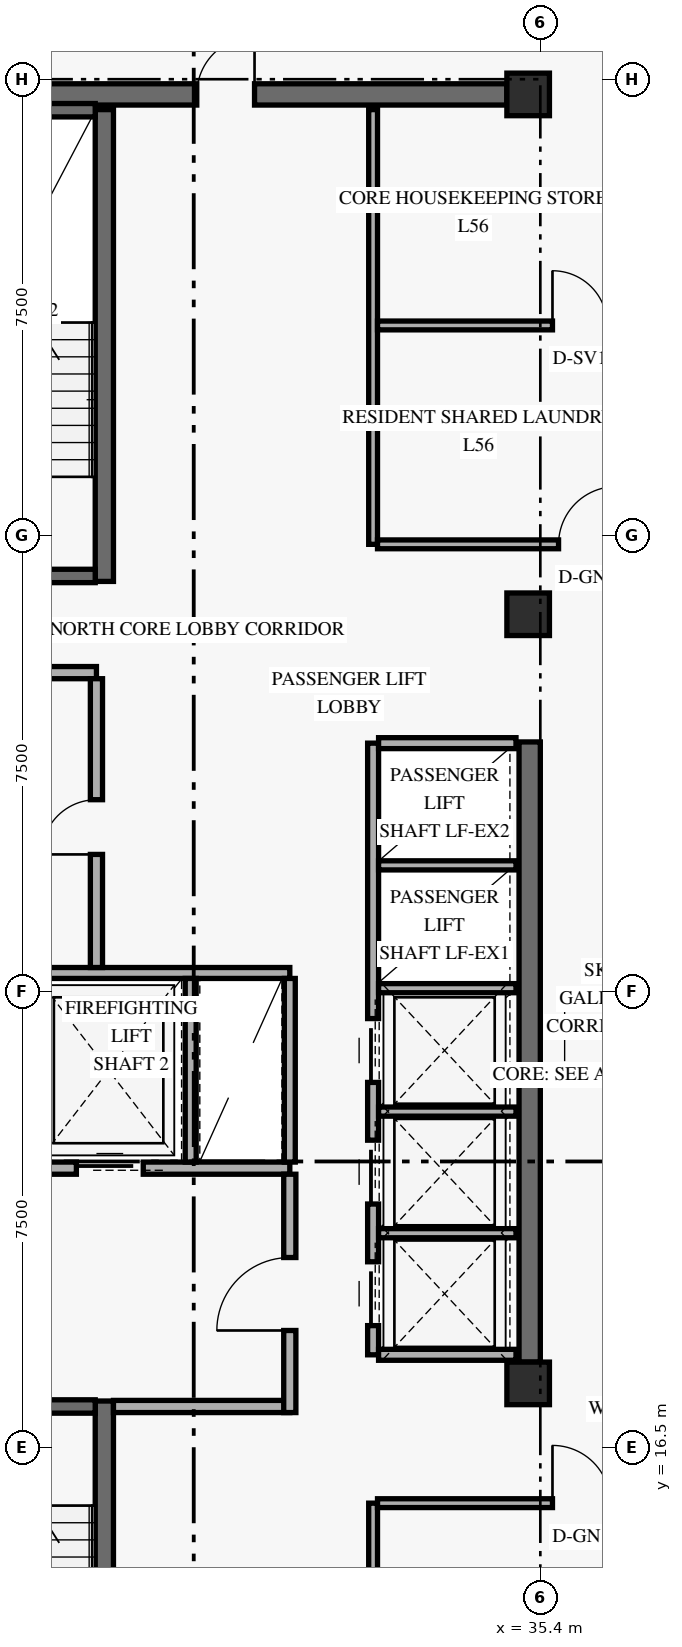
"""IFC4 building model, lengths in metres.
Left out: names, types, materials, properties, quantities, classifications, styles, units other than length and angle.
Written with IfcOpenShell. Run it as: python <this file> out.ifc"""

import sys

from ifc_helpers import new_model, si_unit, direction, frame, frame_2d, origin, origin_2d, place, context, subcontext, project, spatial, rectangle, extrude, element, fill, save


model = new_model("IFC4")
c1 = context("Model", 3, precision=1e-05, world=origin(), true_north=direction((0.0, 1.0)))
c2 = subcontext(c1, "Body", "Model", "MODEL_VIEW")
j1 = project(units=[si_unit("LENGTHUNIT", "METRE"), si_unit("PLANEANGLEUNIT", "RADIAN")], contexts=[c1])
p1 = place(None, origin())
s1 = spatial("IfcSite", under=j1, at=p1, CompositionType="ELEMENT")
p2 = place(p1, origin())
s2 = spatial("IfcBuilding", under=s1, at=p2, CompositionType="ELEMENT")
p3 = place(p2, frame((0.0, 0.0, 216.6)))
s3 = spatial("IfcBuildingStorey", under=s2, at=p3, CompositionType="ELEMENT", Elevation=216.6)
p4 = place(p3, frame((35.225, 17.9, 0.0), z_axis=(0.0, 0.0, 1.0), x_axis=(0.0, 1.0, 0.0)))
e1 = element("IfcWall", 1, at=p4, inside=s3, PredefinedType="SHEAR", context=c2, shape_type="SweptSolid", body=[
    extrude(rectangle(XDim=10.2, YDim=0.35, at=frame_2d((5.1, 0.0))), origin(), (0.0, 0.0, 1.0), 2.821),
])
p5 = place(p3, frame((24.55, 38.75, 0.0), z_axis=(0.0, 0.0, 1.0), x_axis=(1.0, 0.0, 0.0)))
e2 = element("IfcWall", 2, at=p5, inside=s3, PredefinedType="SHEAR", context=c2, shape_type="SweptSolid", body=[
    extrude(rectangle(XDim=10.3, YDim=0.35, at=frame_2d((5.15, 0.0))), origin(), (0.0, 0.0, 1.0), 3.36),
])
p6 = place(p5, frame((5.2, 0.0, 0.0)))
e3 = element("IfcOpeningElement", 3, at=p6, cuts=e2, PredefinedType="OPENING", context=c2, shape_type="SweptSolid", body=[
    extrude(rectangle(XDim=0.95, YDim=2.15, at=frame_2d((0.475, 1.075))), frame((0.0, 0.185, 0.0), z_axis=(0.0, -1.0, 0.0), x_axis=(1.0, 0.0, 0.0)), (0.0, 0.0, 1.0), 0.37),
])
p7 = place(p3, frame((28.23, 9.5, 0.0), z_axis=(0.0, 0.0, 1.0), x_axis=(0.0, 1.0, 0.0)))
e4 = element("IfcWall", 4, at=p7, inside=s3, PredefinedType="SHEAR", context=c2, shape_type="SweptSolid", body=[
    extrude(rectangle(XDim=7.76, YDim=0.3, at=frame_2d((3.88, 0.0))), origin(), (0.0, 0.0, 1.0), 3.36),
])
p8 = place(p3, frame((24.92, 17.17, 0.0), z_axis=(0.0, 0.0, 1.0), x_axis=(1.0, 0.0, 0.0)))
e5 = element("IfcWall", 5, at=p8, inside=s3, PredefinedType="SHEAR", context=c2, shape_type="SweptSolid", body=[
    extrude(rectangle(XDim=3.16, YDim=0.22, at=frame_2d((1.58, 0.0))), origin(), (0.0, 0.0, 1.0), 3.36),
])
p9 = place(p8, frame((0.78, 0.0, 0.0)))
e6 = element("IfcOpeningElement", 6, at=p9, cuts=e5, PredefinedType="OPENING", context=c2, shape_type="SweptSolid", body=[
    extrude(rectangle(XDim=1.05, YDim=2.15, at=frame_2d((0.525, 1.075))), frame((0.0, 0.12, 0.0), z_axis=(0.0, -1.0, 0.0), x_axis=(1.0, 0.0, 0.0)), (0.0, 0.0, 1.0), 0.24),
])
p10 = place(p3, frame((28.23, 30.74, 0.0), z_axis=(0.0, 0.0, 1.0), x_axis=(0.0, 1.0, 0.0)))
e7 = element("IfcWall", 7, at=p10, inside=s3, PredefinedType="SHEAR", context=c2, shape_type="SweptSolid", body=[
    extrude(rectangle(XDim=7.76, YDim=0.3, at=frame_2d((3.88, 0.0))), origin(), (0.0, 0.0, 1.0), 3.36),
])
p11 = place(p3, frame((24.92, 30.83, 0.0), z_axis=(0.0, 0.0, 1.0), x_axis=(1.0, 0.0, 0.0)))
e8 = element("IfcWall", 8, at=p11, inside=s3, PredefinedType="SHEAR", context=c2, shape_type="SweptSolid", body=[
    extrude(rectangle(XDim=3.16, YDim=0.22, at=frame_2d((1.58, 0.0))), origin(), (0.0, 0.0, 1.0), 3.36),
])
p12 = place(p11, frame((0.78, 0.0, 0.0)))
e9 = element("IfcOpeningElement", 9, at=p12, cuts=e8, PredefinedType="OPENING", context=c2, shape_type="SweptSolid", body=[
    extrude(rectangle(XDim=1.05, YDim=2.15, at=frame_2d((0.525, 1.075))), frame((0.0, 0.12, 0.0), z_axis=(0.0, -1.0, 0.0), x_axis=(1.0, 0.0, 0.0)), (0.0, 0.0, 1.0), 0.24),
])
p13 = place(p3, frame((24.92, 38.49, 0.0), z_axis=(0.0, 0.0, 1.0), x_axis=(1.0, 0.0, 0.0)))
e10 = element("IfcWall", 10, at=p13, inside=s3, PredefinedType="SHEAR", context=c2, shape_type="SweptSolid", body=[
    extrude(rectangle(XDim=3.16, YDim=0.22, at=frame_2d((1.58, 0.0))), origin(), (0.0, 0.0, 1.0), 3.36),
])
for number, where, z_axis, x_axis in (
    (11, (35.2, 17.55, 0.0), (0.0, 0.0, 1.0), (1.0, 0.0, 0.0)),
    (12, (35.2, 30.2, 0.0), (0.0, 0.0, 1.0), (1.0, 0.0, 0.0)),
    (13, (35.2, 38.75, 0.0), (0.0, 0.0, 1.0), (1.0, 0.0, 0.0)),
):
    element("IfcColumn", number, at=place(p3, frame(where, z_axis=z_axis, x_axis=x_axis)), inside=s3, PredefinedType="COLUMN", context=c2, shape_type="SweptSolid", body=[
        extrude(rectangle(XDim=0.7, YDim=0.7, at=origin_2d()), origin(), (0.0, 0.0, 1.0), 3.6),
    ])
p14 = place(p3, frame((24.45, 21.09, 0.0), z_axis=(0.0, 0.0, 1.0), x_axis=(1.0, 0.0, 0.0)))
e14 = element("IfcWall", 14, at=p14, inside=s3, PredefinedType="STANDARD", context=c2, shape_type="SweptSolid", body=[
    extrude(rectangle(XDim=6.83, YDim=0.2, at=frame_2d((3.415, 0.0))), origin(), (0.0, 0.0, 1.0), 3.36),
])
p15 = place(p14, frame((0.72, 0.0, 0.0)))
e15 = element("IfcOpeningElement", 15, at=p15, cuts=e14, PredefinedType="OPENING", context=c2, shape_type="SweptSolid", body=[
    extrude(rectangle(XDim=1.1, YDim=2.2, at=frame_2d((0.55, 1.1))), frame((0.0, 0.11, 0.0), z_axis=(0.0, -1.0, 0.0), x_axis=(1.0, 0.0, 0.0)), (0.0, 0.0, 1.0), 0.22),
])
p16 = place(p14, frame((3.32, 0.0, 0.0)))
e16 = element("IfcOpeningElement", 16, at=p16, cuts=e14, PredefinedType="OPENING", context=c2, shape_type="SweptSolid", body=[
    extrude(rectangle(XDim=1.1, YDim=2.2, at=frame_2d((0.55, 1.1))), frame((0.0, 0.11, 0.0), z_axis=(0.0, -1.0, 0.0), x_axis=(1.0, 0.0, 0.0)), (0.0, 0.0, 1.0), 0.22),
])
p17 = place(p3, frame((28.38, 17.17, 0.0), z_axis=(0.0, 0.0, 1.0), x_axis=(1.0, 0.0, 0.0)))
e17 = element("IfcWall", 17, at=p17, inside=s3, PredefinedType="STANDARD", context=c2, shape_type="SweptSolid", body=[
    extrude(rectangle(XDim=2.9, YDim=0.2, at=frame_2d((1.45, 0.0))), origin(), (0.0, 0.0, 1.0), 3.36),
])
p18 = place(p3, frame((31.28, 17.07, 0.0), z_axis=(0.0, 0.0, 1.0), x_axis=(0.0, 1.0, 0.0)))
e18 = element("IfcWall", 18, at=p18, inside=s3, PredefinedType="STANDARD", context=c2, shape_type="SweptSolid", body=[
    extrude(rectangle(XDim=3.92, YDim=0.2, at=frame_2d((1.96, 0.0))), origin(), (0.0, 0.0, 1.0), 2.803),
])
p19 = place(p18, frame((1.35, 0.0, 0.0)))
e19 = element("IfcOpeningElement", 19, at=p19, cuts=e18, PredefinedType="OPENING", context=c2, shape_type="SweptSolid", body=[
    extrude(rectangle(XDim=1.2, YDim=2.15, at=frame_2d((0.6, 1.075))), frame((0.0, 0.11, 0.0), z_axis=(0.0, -1.0, 0.0), x_axis=(1.0, 0.0, 0.0)), (0.0, 0.0, 1.0), 0.22),
])
p20 = place(p3, frame((24.45, 24.3, 0.0), z_axis=(0.0, 0.0, 1.0), x_axis=(1.0, 0.0, 0.0)))
e20 = element("IfcWall", 20, at=p20, inside=s3, PredefinedType="STANDARD", context=c2, shape_type="SweptSolid", body=[
    extrude(rectangle(XDim=6.83, YDim=0.18, at=frame_2d((3.415, 0.0))), origin(), (0.0, 0.0, 1.0), 3.36),
])
for number, where, z_axis, x_axis in (
    (21, (29.65, 21.19, 0.0), (0.0, 0.0, 1.0), (0.0, 1.0, 0.0)),
    (22, (31.28, 21.19, 0.0), (0.0, 0.0, 1.0), (0.0, 1.0, 0.0)),
):
    element("IfcWall", number, at=place(p3, frame(where, z_axis=z_axis, x_axis=x_axis)), inside=s3, PredefinedType="STANDARD", context=c2, shape_type="SweptSolid", body=[
        extrude(rectangle(XDim=3.02, YDim=0.18, at=frame_2d((1.51, 0.0))), origin(), (0.0, 0.0, 1.0), 3.36),
    ])
p21 = place(p3, frame((24.45, 29.24, 0.0), z_axis=(0.0, 0.0, 1.0), x_axis=(1.0, 0.0, 0.0)))
e23 = element("IfcWall", 23, at=p21, inside=s3, PredefinedType="STANDARD", context=c2, shape_type="SweptSolid", body=[
    extrude(rectangle(XDim=3.65, YDim=0.2, at=frame_2d((1.825, 0.0))), origin(), (0.0, 0.0, 1.0), 3.36),
])
p22 = place(p3, frame((28.1, 24.39, 0.0), z_axis=(0.0, 0.0, 1.0), x_axis=(0.0, 1.0, 0.0)))
e24 = element("IfcWall", 24, at=p22, inside=s3, PredefinedType="STANDARD", context=c2, shape_type="SweptSolid", body=[
    extrude(rectangle(XDim=4.75, YDim=0.2, at=frame_2d((2.375, 0.0))), origin(), (0.0, 0.0, 1.0), 3.36),
])
p23 = place(p22, frame((1.86, 0.0, 0.0)))
e25 = element("IfcOpeningElement", 25, at=p23, cuts=e24, PredefinedType="OPENING", context=c2, shape_type="SweptSolid", body=[
    extrude(rectangle(XDim=0.9, YDim=2.1, at=frame_2d((0.45, 1.05))), frame((0.0, 0.11, 0.0), z_axis=(0.0, -1.0, 0.0), x_axis=(1.0, 0.0, 0.0)), (0.0, 0.0, 1.0), 0.22),
])
p24 = place(p3, frame((32.65, 18.02, 0.0), z_axis=(0.0, 0.0, 1.0), x_axis=(0.0, 1.0, 0.0)))
e26 = element("IfcWall", 26, at=p24, inside=s3, PredefinedType="STANDARD", context=c2, shape_type="SweptSolid", body=[
    extrude(rectangle(XDim=10.06, YDim=0.18, at=frame_2d((5.03, 0.0))), origin(), (0.0, 0.0, 1.0), 3.36),
])
p25 = place(p24, frame((0.48, 0.0, 0.0)))
e27 = element("IfcOpeningElement", 27, at=p25, cuts=e26, PredefinedType="OPENING", context=c2, shape_type="SweptSolid", body=[
    extrude(rectangle(XDim=1.05, YDim=2.2, at=frame_2d((0.525, 1.1))), frame((0.0, 0.1, 0.0), z_axis=(0.0, -1.0, 0.0), x_axis=(1.0, 0.0, 0.0)), (0.0, 0.0, 1.0), 0.2),
])
p26 = place(p24, frame((2.48, 0.0, 0.0)))
e28 = element("IfcOpeningElement", 28, at=p26, cuts=e26, PredefinedType="OPENING", context=c2, shape_type="SweptSolid", body=[
    extrude(rectangle(XDim=1.05, YDim=2.2, at=frame_2d((0.525, 1.1))), frame((0.0, 0.1, 0.0), z_axis=(0.0, -1.0, 0.0), x_axis=(1.0, 0.0, 0.0)), (0.0, 0.0, 1.0), 0.2),
])
p27 = place(p24, frame((4.48, 0.0, 0.0)))
e29 = element("IfcOpeningElement", 29, at=p27, cuts=e26, PredefinedType="OPENING", context=c2, shape_type="SweptSolid", body=[
    extrude(rectangle(XDim=1.05, YDim=2.2, at=frame_2d((0.525, 1.1))), frame((0.0, 0.1, 0.0), z_axis=(0.0, -1.0, 0.0), x_axis=(1.0, 0.0, 0.0)), (0.0, 0.0, 1.0), 0.2),
])
for number, where, z_axis, x_axis in (
    (30, (32.74, 18.02, 0.0), (0.0, 0.0, 1.0), (1.0, 0.0, 0.0)),
    (31, (32.74, 28.08, 0.0), (0.0, 0.0, 1.0), (1.0, 0.0, 0.0)),
):
    element("IfcWall", number, at=place(p3, frame(where, z_axis=z_axis, x_axis=x_axis)), inside=s3, PredefinedType="STANDARD", context=c2, shape_type="SweptSolid", body=[
        extrude(rectangle(XDim=2.26, YDim=0.18, at=frame_2d((1.13, 0.0))), origin(), (0.0, 0.0, 1.0), 3.36),
    ])
for number, where, z_axis, x_axis in (
    (32, (32.74, 20.02, 0.0), (0.0, 0.0, 1.0), (1.0, 0.0, 0.0)),
    (33, (32.74, 22.02, 0.0), (0.0, 0.0, 1.0), (1.0, 0.0, 0.0)),
    (34, (32.74, 24.05, 0.0), (0.0, 0.0, 1.0), (1.0, 0.0, 0.0)),
    (35, (32.74, 26.07, 0.0), (0.0, 0.0, 1.0), (1.0, 0.0, 0.0)),
):
    element("IfcWall", number, at=place(p3, frame(where, z_axis=z_axis, x_axis=x_axis)), inside=s3, PredefinedType="STANDARD", context=c2, shape_type="SweptSolid", body=[
        extrude(rectangle(XDim=2.26, YDim=0.15, at=frame_2d((1.13, 0.0))), origin(), (0.0, 0.0, 1.0), 3.36),
    ])
p28 = place(p3, frame((32.65, 9.5, 0.0), z_axis=(0.0, 0.0, 1.0), x_axis=(0.0, 1.0, 0.0)))
e36 = element("IfcWall", 36, at=p28, inside=s3, PredefinedType="PARTITIONING", context=c2, shape_type="SweptSolid", body=[
    extrude(rectangle(XDim=6.08, YDim=0.145, at=frame_2d((3.04, 0.0))), origin(), (0.0, 0.0, 1.0), 3.36),
])
p29 = place(p3, frame((32.722, 15.58, 0.0), z_axis=(0.0, 0.0, 1.0), x_axis=(1.0, 0.0, 0.0)))
e37 = element("IfcWall", 37, at=p29, inside=s3, PredefinedType="PARTITIONING", context=c2, shape_type="SweptSolid", body=[
    extrude(rectangle(XDim=5.228, YDim=0.145, at=frame_2d((2.614, 0.0))), origin(), (0.0, 0.0, 1.0), 2.803),
])
p30 = place(p29, frame((2.877, 0.0, 0.0)))
e38 = element("IfcOpeningElement", 38, at=p30, cuts=e37, PredefinedType="OPENING", context=c2, shape_type="SweptSolid", body=[
    extrude(rectangle(XDim=0.95, YDim=2.15, at=frame_2d((0.475, 1.075))), frame((0.0, 0.083, 0.0), z_axis=(0.0, -1.0, 0.0), x_axis=(1.0, 0.0, 0.0)), (0.0, 0.0, 1.0), 0.165),
])
p31 = place(p3, frame((32.65, 31.35, 0.0), z_axis=(0.0, 0.0, 1.0), x_axis=(0.0, 1.0, 0.0)))
e39 = element("IfcWall", 39, at=p31, inside=s3, PredefinedType="PARTITIONING", context=c2, shape_type="SweptSolid", body=[
    extrude(rectangle(XDim=7.15, YDim=0.145, at=frame_2d((3.575, 0.0))), origin(), (0.0, 0.0, 1.0), 3.36),
])
p32 = place(p3, frame((32.722, 31.35, 0.0), z_axis=(0.0, 0.0, 1.0), x_axis=(1.0, 0.0, 0.0)))
e40 = element("IfcWall", 40, at=p32, inside=s3, PredefinedType="PARTITIONING", context=c2, shape_type="SweptSolid", body=[
    extrude(rectangle(XDim=5.778, YDim=0.145, at=frame_2d((2.889, 0.0))), origin(), (0.0, 0.0, 1.0), 2.803),
])
p33 = place(p32, frame((2.978, 0.0, 0.0)))
e41 = element("IfcOpeningElement", 41, at=p33, cuts=e40, PredefinedType="OPENING", context=c2, shape_type="SweptSolid", body=[
    extrude(rectangle(XDim=0.95, YDim=2.15, at=frame_2d((0.475, 1.075))), frame((0.0, 0.083, 0.0), z_axis=(0.0, -1.0, 0.0), x_axis=(1.0, 0.0, 0.0)), (0.0, 0.0, 1.0), 0.165),
])
p34 = place(p3, frame((32.722, 34.95, 0.0), z_axis=(0.0, 0.0, 1.0), x_axis=(1.0, 0.0, 0.0)))
e42 = element("IfcWall", 42, at=p34, inside=s3, PredefinedType="PARTITIONING", context=c2, shape_type="SweptSolid", body=[
    extrude(rectangle(XDim=5.705, YDim=0.145, at=frame_2d((2.853, 0.0))), origin(), (0.0, 0.0, 1.0), 2.803),
])
p35 = place(p34, frame((2.877, 0.0, 0.0)))
e43 = element("IfcOpeningElement", 43, at=p35, cuts=e42, PredefinedType="OPENING", context=c2, shape_type="SweptSolid", body=[
    extrude(rectangle(XDim=0.9, YDim=2.1, at=frame_2d((0.45, 1.05))), frame((0.0, 0.083, 0.0), z_axis=(0.0, -1.0, 0.0), x_axis=(1.0, 0.0, 0.0)), (0.0, 0.0, 1.0), 0.165),
])
p36 = place(p16, origin())
e44 = element("IfcDoor", 44, at=p36, inside=s3, OperationType="SLIDING_TO_LEFT", PredefinedType="DOOR", context=c2, shape_type="SweptSolid", body=[
    extrude(rectangle(XDim=1.1, YDim=2.2, at=frame_2d((0.55, 1.1))), frame((0.0, 0.025, 0.0), z_axis=(0.0, -1.0, 0.0), x_axis=(1.0, 0.0, 0.0)), (0.0, 0.0, 1.0), 0.05),
])
fill(e16, e44)
p37 = place(p19, origin())
e45 = element("IfcDoor", 45, at=p37, inside=s3, OperationType="SINGLE_SWING_LEFT", PredefinedType="DOOR", context=c2, shape_type="SweptSolid", body=[
    extrude(rectangle(XDim=1.2, YDim=2.15, at=frame_2d((0.6, 1.075))), frame((0.0, 0.025, 0.0), z_axis=(0.0, -1.0, 0.0), x_axis=(1.0, 0.0, 0.0)), (0.0, 0.0, 1.0), 0.05),
])
fill(e19, e45)
p38 = place(p23, origin())
e46 = element("IfcDoor", 46, at=p38, inside=s3, OperationType="SINGLE_SWING_LEFT", PredefinedType="DOOR", context=c2, shape_type="SweptSolid", body=[
    extrude(rectangle(XDim=0.9, YDim=2.1, at=frame_2d((0.45, 1.05))), frame((0.0, 0.025, 0.0), z_axis=(0.0, -1.0, 0.0), x_axis=(1.0, 0.0, 0.0)), (0.0, 0.0, 1.0), 0.05),
])
fill(e25, e46)
p39 = place(p25, origin())
e47 = element("IfcDoor", 47, at=p39, inside=s3, OperationType="SLIDING_TO_LEFT", PredefinedType="DOOR", context=c2, shape_type="SweptSolid", body=[
    extrude(rectangle(XDim=1.05, YDim=2.2, at=frame_2d((0.525, 1.1))), frame((0.0, 0.025, 0.0), z_axis=(0.0, -1.0, 0.0), x_axis=(1.0, 0.0, 0.0)), (0.0, 0.0, 1.0), 0.05),
])
fill(e27, e47)
p40 = place(p26, origin())
e48 = element("IfcDoor", 48, at=p40, inside=s3, OperationType="SLIDING_TO_LEFT", PredefinedType="DOOR", context=c2, shape_type="SweptSolid", body=[
    extrude(rectangle(XDim=1.05, YDim=2.2, at=frame_2d((0.525, 1.1))), frame((0.0, 0.025, 0.0), z_axis=(0.0, -1.0, 0.0), x_axis=(1.0, 0.0, 0.0)), (0.0, 0.0, 1.0), 0.05),
])
fill(e28, e48)
p41 = place(p27, origin())
e49 = element("IfcDoor", 49, at=p41, inside=s3, OperationType="SLIDING_TO_LEFT", PredefinedType="DOOR", context=c2, shape_type="SweptSolid", body=[
    extrude(rectangle(XDim=1.05, YDim=2.2, at=frame_2d((0.525, 1.1))), frame((0.0, 0.025, 0.0), z_axis=(0.0, -1.0, 0.0), x_axis=(1.0, 0.0, 0.0)), (0.0, 0.0, 1.0), 0.05),
])
fill(e29, e49)
p42 = place(p30, origin())
e50 = element("IfcDoor", 50, at=p42, inside=s3, OperationType="SINGLE_SWING_LEFT", PredefinedType="DOOR", context=c2, shape_type="SweptSolid", body=[
    extrude(rectangle(XDim=0.95, YDim=2.15, at=frame_2d((0.475, 1.075))), frame((0.0, 0.025, 0.0), z_axis=(0.0, -1.0, 0.0), x_axis=(1.0, 0.0, 0.0)), (0.0, 0.0, 1.0), 0.05),
])
fill(e38, e50)
p43 = place(p33, origin())
e51 = element("IfcDoor", 51, at=p43, inside=s3, OperationType="SINGLE_SWING_RIGHT", PredefinedType="DOOR", context=c2, shape_type="SweptSolid", body=[
    extrude(rectangle(XDim=0.95, YDim=2.15, at=frame_2d((0.475, 1.075))), frame((0.0, 0.025, 0.0), z_axis=(0.0, -1.0, 0.0), x_axis=(1.0, 0.0, 0.0)), (0.0, 0.0, 1.0), 0.05),
])
fill(e41, e51)
p44 = place(p35, origin())
e52 = element("IfcDoor", 52, at=p44, inside=s3, OperationType="SINGLE_SWING_LEFT", PredefinedType="DOOR", context=c2, shape_type="SweptSolid", body=[
    extrude(rectangle(XDim=0.9, YDim=2.1, at=frame_2d((0.45, 1.05))), frame((0.0, 0.025, 0.0), z_axis=(0.0, -1.0, 0.0), x_axis=(1.0, 0.0, 0.0)), (0.0, 0.0, 1.0), 0.05),
])
fill(e43, e52)
p45 = place(p6, origin())
e53 = element("IfcDoor", 53, at=p45, inside=s3, OperationType="SINGLE_SWING_RIGHT", PredefinedType="DOOR", context=c2, shape_type="SweptSolid", body=[
    extrude(rectangle(XDim=0.95, YDim=2.15, at=frame_2d((0.475, 1.075))), frame((0.0, 0.025, 0.0), z_axis=(0.0, -1.0, 0.0), x_axis=(1.0, 0.0, 0.0)), (0.0, 0.0, 1.0), 0.05),
])
fill(e3, e53)
save(model, sys.argv[1])
